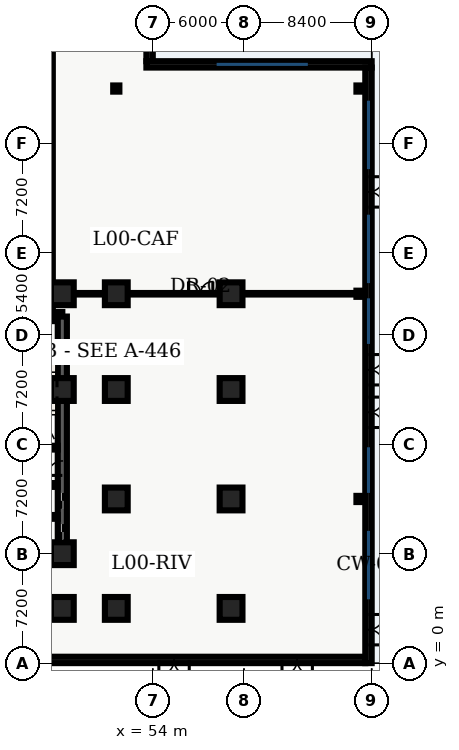
"""IFC4 building model, lengths in metres.
Left out: names, types, materials, properties, quantities, classifications, styles, units other than length and angle.
Written with IfcOpenShell. Run it as: python <this file> out.ifc"""

import sys

from ifc_helpers import new_model, entity, si_unit, converted_unit, direction, frame, origin_with_axes, origin_2d_with_axis, place, context, subcontext, project, spatial, polyline, rectangle, hollow_rectangle, outline, extrude, element, fill, save


model = new_model("IFC4")
c1 = context("Model", 3, precision=1e-05, world=origin_with_axes(), true_north=direction((0.0, 1.0)))
c2 = subcontext(c1, "Body", "Model", "MODEL_VIEW")
j1 = project(units=[si_unit("LENGTHUNIT", "METRE"), converted_unit("PLANEANGLEUNIT", "DEGREE", entity("IfcPlaneAngleMeasure", 0.017), si_unit("PLANEANGLEUNIT", "RADIAN"), dimensions=[0, 0, 0, 0, 0, 0, 0])], contexts=[c1])
p1 = place(None, origin_with_axes())
s1 = spatial("IfcSite", under=j1, at=p1, CompositionType="ELEMENT")
p2 = place(p1, origin_with_axes())
s2 = spatial("IfcBuilding", under=s1, at=p2, CompositionType="ELEMENT")
p3 = place(p2, origin_with_axes())
s3 = spatial("IfcBuildingStorey", under=s2, at=p3, CompositionType="ELEMENT", Elevation=0.0)
p4 = place(p3, frame((40.2, 7.2, 0.0), z_axis=(0.0, 0.0, 1.0), x_axis=(1.0, 0.0, 0.0)))
e1 = element("IfcWall", 1, at=p4, inside=s3, PredefinedType="SHEAR", context=c2, shape_type="SweptSolid", body=[
    extrude(outline(polyline([(0.0, -0.3), (7.85, -0.3), (7.85, 0.3), (0.0, 0.3), (0.0, -0.3)])), origin_with_axes(), (0.0, 0.0, 1.0), 5.46),
])
p5 = place(p4, frame((2.175, 0.0, 0.0), z_axis=(0.0, 0.0, 1.0), x_axis=(1.0, 0.0, 0.0)))
e2 = element("IfcOpeningElement", 2, at=p5, cuts=e1, PredefinedType="OPENING", context=c2, shape_type="SweptSolid", body=[
    extrude(rectangle(XDim=1.05, YDim=0.62, at=origin_2d_with_axis()), origin_with_axes(), (0.0, 0.0, 1.0), 2.15),
])
p6 = place(p3, frame((40.2, 22.8, 0.0), z_axis=(0.0, 0.0, 1.0), x_axis=(1.0, 0.0, 0.0)))
e3 = element("IfcWall", 3, at=p6, inside=s3, PredefinedType="SHEAR", context=c2, shape_type="SweptSolid", body=[
    extrude(outline(polyline([(0.0, -0.3), (7.85, -0.3), (7.85, 0.3), (0.0, 0.3), (0.0, -0.3)])), origin_with_axes(), (0.0, 0.0, 1.0), 5.46),
])
p7 = place(p6, frame((5.775, 0.0, 0.0), z_axis=(0.0, 0.0, 1.0), x_axis=(1.0, 0.0, 0.0)))
e4 = element("IfcOpeningElement", 4, at=p7, cuts=e3, PredefinedType="OPENING", context=c2, shape_type="SweptSolid", body=[
    extrude(rectangle(XDim=1.05, YDim=0.62, at=origin_2d_with_axis()), origin_with_axes(), (0.0, 0.0, 1.0), 2.15),
])
p8 = place(p6, frame((2.15, 0.0, 0.0), z_axis=(0.0, 0.0, 1.0), x_axis=(1.0, 0.0, 0.0)))
e5 = element("IfcOpeningElement", 5, at=p8, cuts=e3, PredefinedType="OPENING", context=c2, shape_type="SweptSolid", body=[
    extrude(rectangle(XDim=0.9, YDim=0.62, at=origin_2d_with_axis()), origin_with_axes(), (0.0, 0.0, 1.0), 2.15),
])
p9 = place(p3, frame((48.05, 7.2, 0.0), z_axis=(0.0, 0.0, 1.0), x_axis=(0.0, 1.0, 0.0)))
e6 = element("IfcWall", 6, at=p9, inside=s3, PredefinedType="SHEAR", context=c2, shape_type="SweptSolid", body=[
    extrude(outline(polyline([(0.0, -0.3), (15.6, -0.3), (15.6, 0.3), (0.0, 0.3), (0.0, -0.3)])), origin_with_axes(), (0.0, 0.0, 1.0), 5.46),
])
p10 = place(p9, frame((1.425, 0.0, 0.0), z_axis=(0.0, 0.0, 1.0), x_axis=(1.0, 0.0, 0.0)))
e7 = element("IfcOpeningElement", 7, at=p10, cuts=e6, PredefinedType="OPENING", context=c2, shape_type="SweptSolid", body=[
    extrude(rectangle(XDim=1.05, YDim=0.62, at=origin_2d_with_axis()), origin_with_axes(), (0.0, 0.0, 1.0), 2.15),
])
p11 = place(p9, frame((3.475, 0.0, 0.0), z_axis=(0.0, 0.0, 1.0), x_axis=(1.0, 0.0, 0.0)))
e8 = element("IfcOpeningElement", 8, at=p11, cuts=e6, PredefinedType="OPENING", context=c2, shape_type="SweptSolid", body=[
    extrude(rectangle(XDim=1.05, YDim=0.62, at=origin_2d_with_axis()), origin_with_axes(), (0.0, 0.0, 1.0), 2.15),
])
p12 = place(p9, frame((5.625, 0.0, 0.0), z_axis=(0.0, 0.0, 1.0), x_axis=(1.0, 0.0, 0.0)))
e9 = element("IfcOpeningElement", 9, at=p12, cuts=e6, PredefinedType="OPENING", context=c2, shape_type="SweptSolid", body=[
    extrude(rectangle(XDim=0.95, YDim=0.62, at=origin_2d_with_axis()), origin_with_axes(), (0.0, 0.0, 1.0), 2.15),
])
p13 = place(p3, frame((44.25, 14.175, 0.0), z_axis=(0.0, 0.0, 1.0), x_axis=(1.0, 0.0, 0.0)))
e10 = element("IfcWall", 10, at=p13, inside=s3, PredefinedType="SHEAR", context=c2, shape_type="SweptSolid", body=[
    extrude(outline(polyline([(0.0, -0.125), (3.5, -0.125), (3.5, 0.125), (0.0, 0.125), (0.0, -0.125)])), origin_with_axes(), (0.0, 0.0, 1.0), 5.46),
])
for number, where, z_axis, x_axis in (
    (11, (48.05, 3.6, 0.0), (0.0, 0.0, 1.0), (1.0, 0.0, 0.0)),
    (12, (48.05, 7.2, 0.0), (0.0, 0.0, 1.0), (1.0, 0.0, 0.0)),
    (13, (48.05, 18.0, 0.0), (0.0, 0.0, 1.0), (1.0, 0.0, 0.0)),
    (14, (48.05, 24.3, 0.0), (0.0, 0.0, 1.0), (1.0, 0.0, 0.0)),
    (15, (51.6, 3.6, 0.0), (0.0, 0.0, 1.0), (1.0, 0.0, 0.0)),
    (16, (51.6, 10.8, 0.0), (0.0, 0.0, 1.0), (1.0, 0.0, 0.0)),
    (17, (51.6, 18.0, 0.0), (0.0, 0.0, 1.0), (1.0, 0.0, 0.0)),
    (18, (51.6, 24.3, 0.0), (0.0, 0.0, 1.0), (1.0, 0.0, 0.0)),
    (19, (59.15, 3.6, 0.0), (0.0, 0.0, 1.0), (1.0, 0.0, 0.0)),
    (20, (59.15, 10.8, 0.0), (0.0, 0.0, 1.0), (1.0, 0.0, 0.0)),
    (21, (59.15, 18.0, 0.0), (0.0, 0.0, 1.0), (1.0, 0.0, 0.0)),
    (22, (59.15, 24.3, 0.0), (0.0, 0.0, 1.0), (1.0, 0.0, 0.0)),
):
    element("IfcColumn", number, at=place(p3, frame(where, z_axis=z_axis, x_axis=x_axis)), inside=s3, PredefinedType="COLUMN", context=c2, shape_type="SweptSolid", body=[
        extrude(rectangle(XDim=1.5, YDim=1.5, at=origin_2d_with_axis()), origin_with_axes(), (0.0, 0.0, 1.0), 5.7),
    ])
for number, where, z_axis, x_axis in (
    (23, (67.6, 10.8, 0.0), (0.0, 0.0, 1.0), (1.0, 0.0, 0.0)),
    (24, (67.6, 24.3, 0.0), (0.0, 0.0, 1.0), (1.0, 0.0, 0.0)),
    (25, (67.6, 37.8, 0.0), (0.0, 0.0, 1.0), (1.0, 0.0, 0.0)),
    (26, (51.6, 37.8, 0.0), (0.0, 0.0, 1.0), (1.0, 0.0, 0.0)),
):
    element("IfcColumn", number, at=place(p3, frame(where, z_axis=z_axis, x_axis=x_axis)), inside=s3, PredefinedType="COLUMN", context=c2, shape_type="SweptSolid", body=[
        extrude(hollow_rectangle(XDim=0.406, YDim=0.406, WallThickness=0.015, InnerFilletRadius=0.015, OuterFilletRadius=0.03, at=origin_2d_with_axis()), origin_with_axes(), (0.0, 0.0, 1.0), 5.7),
    ])
for number, where, z_axis, x_axis in (
    (27, (44.25, 9.62, 0.0), (0.0, 0.0, 1.0), (1.0, 0.0, 0.0)),
    (28, (44.25, 11.72, 0.0), (0.0, 0.0, 1.0), (1.0, 0.0, 0.0)),
):
    element("IfcWall", number, at=place(p3, frame(where, z_axis=z_axis, x_axis=x_axis)), inside=s3, PredefinedType="SOLIDWALL", context=c2, shape_type="SweptSolid", body=[
        extrude(outline(polyline([(0.0, -0.125), (3.5, -0.125), (3.5, 0.125), (0.0, 0.125), (0.0, -0.125)])), origin_with_axes(), (0.0, 0.0, 1.0), 3.2),
    ])
p14 = place(p3, frame((47.3, 22.8, 0.0), z_axis=(0.0, 0.0, 1.0), x_axis=(0.0, 1.0, 0.0)))
e29 = element("IfcWall", 29, at=p14, inside=s3, PredefinedType="SOLIDWALL", context=c2, shape_type="SweptSolid", body=[
    extrude(outline(polyline([(0.0, -0.125), (26.28, -0.125), (26.28, 0.125), (0.0, 0.125), (0.0, -0.125)])), origin_with_axes(), (0.0, 0.0, 1.0), 3.2),
])
p15 = place(p3, frame((48.35, 24.3, 0.0), z_axis=(0.0, 0.0, 1.0), x_axis=(1.0, 0.0, 0.0)))
e30 = element("IfcWall", 30, at=p15, inside=s3, PredefinedType="PARTITIONING", context=c2, shape_type="SweptSolid", body=[
    extrude(outline(polyline([(0.0, -0.05), (19.63, -0.05), (19.63, 0.05), (0.0, 0.05), (0.0, -0.05)])), origin_with_axes(), (0.0, 0.0, 1.0), 3.2),
])
p16 = place(p15, frame((8.8, 0.0, 0.0), z_axis=(0.0, 0.0, 1.0), x_axis=(1.0, 0.0, 0.0)))
e31 = element("IfcOpeningElement", 31, at=p16, cuts=e30, PredefinedType="OPENING", context=c2, shape_type="SweptSolid", body=[
    extrude(rectangle(XDim=1.6, YDim=0.12, at=origin_2d_with_axis()), origin_with_axes(), (0.0, 0.0, 1.0), 2.2),
])
p17 = place(p3, frame((67.98, 0.21, 0.0), z_axis=(0.0, 0.0, 1.0), x_axis=(-1.0, 0.0, 0.0)))
e32 = element("IfcWall", 32, at=p17, inside=s3, PredefinedType="SOLIDWALL", context=c2, shape_type="SweptSolid", body=[
    extrude(outline(polyline([(0.0, -0.21), (67.98, -0.21), (67.98, 0.21), (0.0, 0.21), (0.0, -0.21)])), origin_with_axes(), (0.0, 0.0, 1.0), 5.46),
])
p18 = place(p17, frame((64.88, 0.0, 0.0), z_axis=(0.0, 0.0, 1.0), x_axis=(1.0, 0.0, 0.0)))
e33 = element("IfcOpeningElement", 33, at=p18, cuts=e32, PredefinedType="OPENING", context=c2, shape_type="SweptSolid", body=[
    extrude(rectangle(XDim=1.8, YDim=0.44, at=origin_2d_with_axis()), origin_with_axes(), (0.0, 0.0, 1.0), 2.2),
])
p19 = place(p17, frame((54.18, 0.0, 0.0), z_axis=(0.0, 0.0, 1.0), x_axis=(1.0, 0.0, 0.0)))
e34 = element("IfcOpeningElement", 34, at=p19, cuts=e32, PredefinedType="OPENING", context=c2, shape_type="SweptSolid", body=[
    extrude(rectangle(XDim=1.8, YDim=0.44, at=origin_2d_with_axis()), origin_with_axes(), (0.0, 0.0, 1.0), 2.2),
])
p20 = place(p17, frame((48.18, 0.0, 0.0), z_axis=(0.0, 0.0, 1.0), x_axis=(1.0, 0.0, 0.0)))
e35 = element("IfcOpeningElement", 35, at=p20, cuts=e32, PredefinedType="OPENING", context=c2, shape_type="SweptSolid", body=[
    extrude(rectangle(XDim=1.8, YDim=0.44, at=origin_2d_with_axis()), origin_with_axes(), (0.0, 0.0, 1.0), 2.2),
])
p21 = place(p17, frame((44.98, 0.0, 0.0), z_axis=(0.0, 0.0, 1.0), x_axis=(1.0, 0.0, 0.0)))
e36 = element("IfcOpeningElement", 36, at=p21, cuts=e32, PredefinedType="OPENING", context=c2, shape_type="SweptSolid", body=[
    extrude(rectangle(XDim=2.0, YDim=0.44, at=origin_2d_with_axis()), origin_with_axes(), (0.0, 0.0, 1.0), 2.4),
])
p22 = place(p17, frame((34.98, 0.0, 0.0), z_axis=(0.0, 0.0, 1.0), x_axis=(1.0, 0.0, 0.0)))
e37 = element("IfcOpeningElement", 37, at=p22, cuts=e32, PredefinedType="OPENING", context=c2, shape_type="SweptSolid", body=[
    extrude(rectangle(XDim=2.0, YDim=0.44, at=origin_2d_with_axis()), origin_with_axes(), (0.0, 0.0, 1.0), 2.4),
])
p23 = place(p17, frame((25.78, 0.0, 0.0), z_axis=(0.0, 0.0, 1.0), x_axis=(1.0, 0.0, 0.0)))
e38 = element("IfcOpeningElement", 38, at=p23, cuts=e32, PredefinedType="OPENING", context=c2, shape_type="SweptSolid", body=[
    extrude(rectangle(XDim=1.8, YDim=0.44, at=origin_2d_with_axis()), origin_with_axes(), (0.0, 0.0, 1.0), 2.2),
])
p24 = place(p17, frame((12.58, 0.0, 0.0), z_axis=(0.0, 0.0, 1.0), x_axis=(1.0, 0.0, 0.0)))
e39 = element("IfcOpeningElement", 39, at=p24, cuts=e32, PredefinedType="OPENING", context=c2, shape_type="SweptSolid", body=[
    extrude(rectangle(XDim=2.0, YDim=0.44, at=origin_2d_with_axis()), origin_with_axes(), (0.0, 0.0, 1.0), 2.4),
])
p25 = place(p17, frame((4.48, 0.0, 0.0), z_axis=(0.0, 0.0, 1.0), x_axis=(1.0, 0.0, 0.0)))
e40 = element("IfcOpeningElement", 40, at=p25, cuts=e32, PredefinedType="OPENING", context=c2, shape_type="SweptSolid", body=[
    extrude(rectangle(XDim=2.0, YDim=0.44, at=origin_2d_with_axis()), origin_with_axes(), (0.0, 0.0, 1.0), 2.4),
])
p26 = place(p3, frame((53.79, 49.08, 0.0), z_axis=(0.0, 0.0, 1.0), x_axis=(0.0, -1.0, 0.0)))
e41 = element("IfcWall", 41, at=p26, inside=s3, PredefinedType="SOLIDWALL", context=c2, shape_type="SweptSolid", body=[
    extrude(outline(polyline([(0.0, -0.21), (9.48, -0.21), (9.48, 0.21), (0.0, 0.21), (0.0, -0.21)])), origin_with_axes(), (0.0, 0.0, 1.0), 5.46),
])
p27 = place(p3, frame((53.58, 39.39, 0.0), z_axis=(0.0, 0.0, 1.0), x_axis=(1.0, 0.0, 0.0)))
e42 = element("IfcWall", 42, at=p27, inside=s3, PredefinedType="SOLIDWALL", context=c2, shape_type="SweptSolid", body=[
    extrude(outline(polyline([(0.0, -0.21), (14.82, -0.21), (14.82, 0.21), (0.0, 0.21), (0.0, -0.21)])), origin_with_axes(), (0.0, 0.0, 1.0), 5.46),
])
p28 = place(p3, frame((68.19, 39.18, 0.0), z_axis=(0.0, 0.0, 1.0), x_axis=(0.0, -1.0, 0.0)))
e43 = element("IfcWall", 43, at=p28, inside=s3, PredefinedType="SOLIDWALL", context=c2, shape_type="SweptSolid", body=[
    extrude(outline(polyline([(0.0, -0.21), (39.18, -0.21), (39.18, 0.21), (0.0, 0.21), (0.0, -0.21)])), origin_with_axes(), (0.0, 0.0, 1.0), 5.46),
])
p29 = place(p28, frame((36.98, 0.0, 0.0), z_axis=(0.0, 0.0, 1.0), x_axis=(1.0, 0.0, 0.0)))
e44 = element("IfcOpeningElement", 44, at=p29, cuts=e43, PredefinedType="OPENING", context=c2, shape_type="SweptSolid", body=[
    extrude(rectangle(XDim=2.0, YDim=0.44, at=origin_2d_with_axis()), origin_with_axes(), (0.0, 0.0, 1.0), 2.4),
])
p30 = place(p28, frame((22.68, 0.0, 0.0), z_axis=(0.0, 0.0, 1.0), x_axis=(1.0, 0.0, 0.0)))
e45 = element("IfcOpeningElement", 45, at=p30, cuts=e43, PredefinedType="OPENING", context=c2, shape_type="SweptSolid", body=[
    extrude(rectangle(XDim=2.0, YDim=0.44, at=origin_2d_with_axis()), origin_with_axes(), (0.0, 0.0, 1.0), 2.4),
])
p31 = place(p28, frame((19.88, 0.0, 0.0), z_axis=(0.0, 0.0, 1.0), x_axis=(1.0, 0.0, 0.0)))
e46 = element("IfcOpeningElement", 46, at=p31, cuts=e43, PredefinedType="OPENING", context=c2, shape_type="SweptSolid", body=[
    extrude(rectangle(XDim=2.0, YDim=0.44, at=origin_2d_with_axis()), origin_with_axes(), (0.0, 0.0, 1.0), 2.4),
])
p32 = place(p28, frame((8.18, 0.0, 0.0), z_axis=(0.0, 0.0, 1.0), x_axis=(1.0, 0.0, 0.0)))
e47 = element("IfcOpeningElement", 47, at=p32, cuts=e43, PredefinedType="OPENING", context=c2, shape_type="SweptSolid", body=[
    extrude(rectangle(XDim=2.0, YDim=0.44, at=origin_2d_with_axis()), origin_with_axes(), (0.0, 0.0, 1.0), 2.4),
])
p33 = place(p9, frame((1.425, 0.0, 0.0), z_axis=(0.0, 0.0, 1.0), x_axis=(1.0, 0.0, 0.0)))
e48 = element("IfcDoor", 48, at=p33, inside=s3, OperationType="SLIDING_TO_LEFT", PredefinedType="DOOR", context=c2, shape_type="SweptSolid", body=[
    extrude(rectangle(XDim=1.05, YDim=0.09, at=origin_2d_with_axis()), origin_with_axes(), (0.0, 0.0, 1.0), 2.15),
])
fill(e7, e48)
p34 = place(p9, frame((3.475, 0.0, 0.0), z_axis=(0.0, 0.0, 1.0), x_axis=(1.0, 0.0, 0.0)))
e49 = element("IfcDoor", 49, at=p34, inside=s3, OperationType="SLIDING_TO_RIGHT", PredefinedType="DOOR", context=c2, shape_type="SweptSolid", body=[
    extrude(rectangle(XDim=1.05, YDim=0.09, at=origin_2d_with_axis()), origin_with_axes(), (0.0, 0.0, 1.0), 2.15),
])
fill(e8, e49)
p35 = place(p9, frame((5.625, 0.0, 0.0), z_axis=(0.0, 0.0, 1.0), x_axis=(1.0, 0.0, 0.0)))
e50 = element("IfcDoor", 50, at=p35, inside=s3, OperationType="SINGLE_SWING_LEFT", PredefinedType="DOOR", context=c2, shape_type="SweptSolid", body=[
    extrude(rectangle(XDim=0.95, YDim=0.09, at=origin_2d_with_axis()), origin_with_axes(), (0.0, 0.0, 1.0), 2.15),
])
fill(e9, e50)
p36 = place(p15, frame((8.8, 0.0, 0.0), z_axis=(0.0, 0.0, 1.0), x_axis=(1.0, 0.0, 0.0)))
e51 = element("IfcDoor", 51, at=p36, inside=s3, OperationType="DOUBLE_DOOR_SINGLE_SWING", PredefinedType="DOOR", context=c2, shape_type="SweptSolid", body=[
    extrude(rectangle(XDim=1.6, YDim=0.06, at=origin_2d_with_axis()), origin_with_axes(), (0.0, 0.0, 1.0), 2.2),
])
fill(e31, e51)
p37 = place(p17, frame((12.58, 0.0, 0.0), z_axis=(0.0, 0.0, 1.0), x_axis=(1.0, 0.0, 0.0)))
e52 = element("IfcDoor", 52, at=p37, inside=s3, OperationType="DOUBLE_DOOR_SINGLE_SWING", PredefinedType="DOOR", context=c2, shape_type="SweptSolid", body=[
    extrude(rectangle(XDim=2.0, YDim=0.09, at=origin_2d_with_axis()), origin_with_axes(), (0.0, 0.0, 1.0), 2.4),
])
fill(e39, e52)
p38 = place(p17, frame((4.48, 0.0, 0.0), z_axis=(0.0, 0.0, 1.0), x_axis=(1.0, 0.0, 0.0)))
e53 = element("IfcDoor", 53, at=p38, inside=s3, OperationType="DOUBLE_DOOR_SINGLE_SWING", PredefinedType="DOOR", context=c2, shape_type="SweptSolid", body=[
    extrude(rectangle(XDim=2.0, YDim=0.09, at=origin_2d_with_axis()), origin_with_axes(), (0.0, 0.0, 1.0), 2.4),
])
fill(e40, e53)
p39 = place(p28, frame((36.98, 0.0, 0.0), z_axis=(0.0, 0.0, 1.0), x_axis=(1.0, 0.0, 0.0)))
e54 = element("IfcDoor", 54, at=p39, inside=s3, OperationType="DOUBLE_DOOR_SINGLE_SWING", PredefinedType="DOOR", context=c2, shape_type="SweptSolid", body=[
    extrude(rectangle(XDim=2.0, YDim=0.09, at=origin_2d_with_axis()), origin_with_axes(), (0.0, 0.0, 1.0), 2.4),
])
fill(e44, e54)
p40 = place(p28, frame((22.68, 0.0, 0.0), z_axis=(0.0, 0.0, 1.0), x_axis=(1.0, 0.0, 0.0)))
e55 = element("IfcDoor", 55, at=p40, inside=s3, OperationType="DOUBLE_DOOR_SINGLE_SWING", PredefinedType="DOOR", context=c2, shape_type="SweptSolid", body=[
    extrude(rectangle(XDim=2.0, YDim=0.09, at=origin_2d_with_axis()), origin_with_axes(), (0.0, 0.0, 1.0), 2.4),
])
fill(e45, e55)
p41 = place(p28, frame((19.88, 0.0, 0.0), z_axis=(0.0, 0.0, 1.0), x_axis=(1.0, 0.0, 0.0)))
e56 = element("IfcDoor", 56, at=p41, inside=s3, OperationType="DOUBLE_DOOR_SINGLE_SWING", PredefinedType="DOOR", context=c2, shape_type="SweptSolid", body=[
    extrude(rectangle(XDim=2.0, YDim=0.09, at=origin_2d_with_axis()), origin_with_axes(), (0.0, 0.0, 1.0), 2.4),
])
fill(e46, e56)
p42 = place(p28, frame((8.18, 0.0, 0.0), z_axis=(0.0, 0.0, 1.0), x_axis=(1.0, 0.0, 0.0)))
e57 = element("IfcDoor", 57, at=p42, inside=s3, OperationType="DOUBLE_DOOR_SINGLE_SWING", PredefinedType="DOOR", context=c2, shape_type="SweptSolid", body=[
    extrude(rectangle(XDim=2.0, YDim=0.09, at=origin_2d_with_axis()), origin_with_axes(), (0.0, 0.0, 1.0), 2.4),
])
fill(e47, e57)
save(model, sys.argv[1])
